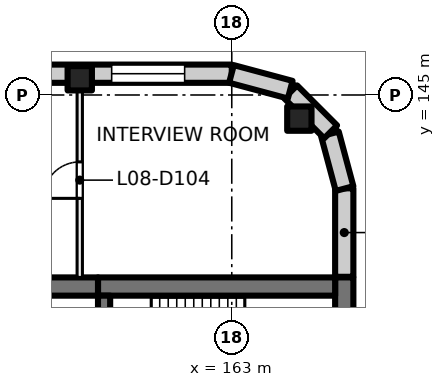
"""IFC4 building model, lengths in metres.
Left out: names, types, materials, properties, quantities, classifications, styles, units other than length and angle.
Written with IfcOpenShell. Run it as: python <this file> out.ifc"""

import sys

from ifc_helpers import new_model, si_unit, direction, frame, frame_2d, origin, origin_2d, place, context, subcontext, project, spatial, rectangle, extrude, element, fill, save


model = new_model("IFC4")
c1 = context("Model", 3, precision=1e-05, world=origin(), true_north=direction((0.0, 1.0)))
c2 = subcontext(c1, "Body", "Model", "MODEL_VIEW")
j1 = project(units=[si_unit("LENGTHUNIT", "METRE"), si_unit("PLANEANGLEUNIT", "RADIAN")], contexts=[c1])
p1 = place(None, origin())
s1 = spatial("IfcSite", under=j1, at=p1, CompositionType="ELEMENT")
p2 = place(p1, origin())
s2 = spatial("IfcBuilding", under=s1, at=p2, CompositionType="ELEMENT")
p3 = place(p2, frame((0.0, 0.0, 39.5)))
s3 = spatial("IfcBuildingStorey", under=s2, at=p3, CompositionType="ELEMENT", Elevation=39.5)
for number, where, z_axis, x_axis in (
    (1, (165.223, 144.223, 0.0), (0.0, 0.0, 1.0), (1.0, 0.0, 0.0)),
    (2, (158.0, 145.55, 0.0), (0.0, 0.0, 1.0), (1.0, 0.0, 0.0)),
):
    element("IfcColumn", number, at=place(p3, frame(where, z_axis=z_axis, x_axis=x_axis)), inside=s3, PredefinedType="COLUMN", context=c2, shape_type="SweptSolid", body=[
        extrude(rectangle(XDim=0.8, YDim=0.8, at=origin_2d()), origin(), (0.0, 0.0, 1.0), 4.0),
    ])
p4 = place(p3, frame((166.7, 139.0, 0.0), z_axis=(0.0, 0.0, 1.0), x_axis=(0.0, -1.0, 0.0)))
e3 = element("IfcWall", 3, at=p4, inside=s3, PredefinedType="SHEAR", context=c2, shape_type="SweptSolid", body=[
    extrude(rectangle(XDim=3.8, YDim=0.6, at=frame_2d((1.9, 0.0))), origin(), (0.0, 0.0, 1.0), 4.0),
])
p5 = place(p3, frame((166.4, 138.7, 0.0), z_axis=(0.0, 0.0, 1.0), x_axis=(-1.0, 0.0, 0.0)))
e4 = element("IfcWall", 4, at=p5, inside=s3, PredefinedType="SHEAR", context=c2, shape_type="SweptSolid", body=[
    extrude(rectangle(XDim=7.8, YDim=0.6, at=frame_2d((3.9, 0.0))), origin(), (0.0, 0.0, 1.0), 4.0),
])
p6 = place(p3, frame((158.6, 138.7, 0.0), z_axis=(0.0, 0.0, 1.0), x_axis=(-1.0, 0.0, 0.0)))
e5 = element("IfcWall", 5, at=p6, inside=s3, PredefinedType="SHEAR", context=c2, shape_type="SweptSolid", body=[
    extrude(rectangle(XDim=4.6, YDim=0.6, at=frame_2d((2.3, 0.0))), origin(), (0.0, 0.0, 1.0), 4.0),
])
p7 = place(p3, frame((158.8, 138.4, 0.0), z_axis=(0.0, 0.0, 1.0), x_axis=(0.0, -1.0, 0.0)))
e6 = element("IfcWall", 6, at=p7, inside=s3, PredefinedType="SHEAR", context=c2, shape_type="SweptSolid", body=[
    extrude(rectangle(XDim=2.8, YDim=0.4, at=frame_2d((1.4, 0.0))), origin(), (0.0, 0.0, 1.0), 4.0),
])
p8 = place(p7, frame((0.9, 0.0, 0.0)))
e7 = element("IfcOpeningElement", 7, at=p8, cuts=e6, PredefinedType="OPENING", context=c2, shape_type="SweptSolid", body=[
    extrude(rectangle(XDim=1.0, YDim=2.1, at=frame_2d((0.5, 1.05))), frame((0.0, 0.21, 0.0), z_axis=(0.0, -1.0, 0.0), x_axis=(1.0, 0.0, 0.0)), (0.0, 0.0, 1.0), 0.42),
])
p9 = place(p3, frame((131.07, 145.7, 0.0), z_axis=(0.0, 0.0, 1.0), x_axis=(1.0, 0.0, 0.0)))
e8 = element("IfcWall", 8, at=p9, inside=s3, PredefinedType="SOLIDWALL", context=c2, shape_type="SweptSolid", body=[
    extrude(rectangle(XDim=31.93, YDim=0.6, at=frame_2d((15.965, 0.0))), origin(), (0.0, 0.0, 1.0), 3.625),
])
p10 = place(p9, frame((0.98, 0.0, 0.9)))
e9 = element("IfcOpeningElement", 9, at=p10, cuts=e8, PredefinedType="OPENING", context=c2, shape_type="SweptSolid", body=[
    extrude(rectangle(XDim=2.4, YDim=2.4, at=frame_2d((1.2, 1.2))), frame((0.0, 0.31, 0.0), z_axis=(0.0, -1.0, 0.0), x_axis=(1.0, 0.0, 0.0)), (0.0, 0.0, 1.0), 0.62),
])
p11 = place(p9, frame((5.48, 0.0, 0.9)))
e10 = element("IfcOpeningElement", 10, at=p11, cuts=e8, PredefinedType="OPENING", context=c2, shape_type="SweptSolid", body=[
    extrude(rectangle(XDim=2.4, YDim=2.4, at=frame_2d((1.2, 1.2))), frame((0.0, 0.31, 0.0), z_axis=(0.0, -1.0, 0.0), x_axis=(1.0, 0.0, 0.0)), (0.0, 0.0, 1.0), 0.62),
])
p12 = place(p9, frame((9.98, 0.0, 0.9)))
e11 = element("IfcOpeningElement", 11, at=p12, cuts=e8, PredefinedType="OPENING", context=c2, shape_type="SweptSolid", body=[
    extrude(rectangle(XDim=2.4, YDim=2.4, at=frame_2d((1.2, 1.2))), frame((0.0, 0.31, 0.0), z_axis=(0.0, -1.0, 0.0), x_axis=(1.0, 0.0, 0.0)), (0.0, 0.0, 1.0), 0.62),
])
p13 = place(p9, frame((14.48, 0.0, 0.9)))
e12 = element("IfcOpeningElement", 12, at=p13, cuts=e8, PredefinedType="OPENING", context=c2, shape_type="SweptSolid", body=[
    extrude(rectangle(XDim=2.4, YDim=2.4, at=frame_2d((1.2, 1.2))), frame((0.0, 0.31, 0.0), z_axis=(0.0, -1.0, 0.0), x_axis=(1.0, 0.0, 0.0)), (0.0, 0.0, 1.0), 0.62),
])
p14 = place(p9, frame((18.98, 0.0, 0.9)))
e13 = element("IfcOpeningElement", 13, at=p14, cuts=e8, PredefinedType="OPENING", context=c2, shape_type="SweptSolid", body=[
    extrude(rectangle(XDim=2.4, YDim=2.4, at=frame_2d((1.2, 1.2))), frame((0.0, 0.31, 0.0), z_axis=(0.0, -1.0, 0.0), x_axis=(1.0, 0.0, 0.0)), (0.0, 0.0, 1.0), 0.62),
])
p15 = place(p9, frame((23.48, 0.0, 0.9)))
e14 = element("IfcOpeningElement", 14, at=p15, cuts=e8, PredefinedType="OPENING", context=c2, shape_type="SweptSolid", body=[
    extrude(rectangle(XDim=2.4, YDim=2.4, at=frame_2d((1.2, 1.2))), frame((0.0, 0.31, 0.0), z_axis=(0.0, -1.0, 0.0), x_axis=(1.0, 0.0, 0.0)), (0.0, 0.0, 1.0), 0.62),
])
p16 = place(p9, frame((27.98, 0.0, 0.9)))
e15 = element("IfcOpeningElement", 15, at=p16, cuts=e8, PredefinedType="OPENING", context=c2, shape_type="SweptSolid", body=[
    extrude(rectangle(XDim=2.4, YDim=2.4, at=frame_2d((1.2, 1.2))), frame((0.0, 0.31, 0.0), z_axis=(0.0, -1.0, 0.0), x_axis=(1.0, 0.0, 0.0)), (0.0, 0.0, 1.0), 0.62),
])
p17 = place(p3, frame((166.7, 141.93, 0.0), z_axis=(0.0, 0.0, 1.0), x_axis=(0.0, -1.0, 0.0)))
e16 = element("IfcWall", 16, at=p17, inside=s3, PredefinedType="SOLIDWALL", context=c2, shape_type="SweptSolid", body=[
    extrude(rectangle(XDim=2.91, YDim=0.6, at=frame_2d((1.455, 0.0))), origin(), (0.0, 0.0, 1.0), 3.625),
])
for number, where, z_axis, x_axis in (
    (17, (166.229, 143.719, 0.0), (0.0, 0.0, 1.0), (0.259, -0.966, 0.0)),
    (18, (164.936, 145.104, 0.0), (0.0, 0.0, 1.0), (0.707, -0.707, 0.0)),
):
    element("IfcWall", number, at=place(p3, frame(where, z_axis=z_axis, x_axis=x_axis)), inside=s3, PredefinedType="SOLIDWALL", context=c2, shape_type="SweptSolid", body=[
        extrude(rectangle(XDim=1.861, YDim=0.6, at=frame_2d((0.93, 0.0))), origin(), (0.0, 0.0, 1.0), 3.625),
    ])
p18 = place(p3, frame((162.99, 145.692, 0.0), z_axis=(0.0, 0.0, 1.0), x_axis=(0.965920269068, -0.258839784042, 0.0)))
e19 = element("IfcWall", 19, at=p18, inside=s3, PredefinedType="SOLIDWALL", context=c2, shape_type="SweptSolid", body=[
    extrude(rectangle(XDim=2.0, YDim=0.6, at=frame_2d((1.0, 0.0))), origin(), (0.0, 0.0, 1.0), 3.625),
])
p19 = place(p3, frame((158.0, 139.0, 0.0), z_axis=(0.0, 0.0, 1.0), x_axis=(0.0, 1.0, 0.0)))
e20 = element("IfcWall", 20, at=p19, inside=s3, PredefinedType="PARTITIONING", context=c2, shape_type="SweptSolid", body=[
    extrude(rectangle(XDim=6.4, YDim=0.175, at=frame_2d((3.2, 0.0))), origin(), (0.0, 0.0, 1.0), 3.625),
])
p20 = place(p19, frame((2.6, 0.0, 0.0)))
e21 = element("IfcOpeningElement", 21, at=p20, cuts=e20, PredefinedType="OPENING", context=c2, shape_type="SweptSolid", body=[
    extrude(rectangle(XDim=1.2, YDim=2.1, at=frame_2d((0.6, 1.05))), frame((0.0, 0.097, 0.0), z_axis=(0.0, -1.0, 0.0), x_axis=(1.0, 0.0, 0.0)), (0.0, 0.0, 1.0), 0.195),
])
p21 = place(p16, origin())
e22 = element("IfcWindow", 22, at=p21, inside=s3, PartitioningType="SINGLE_PANEL", PredefinedType="WINDOW", context=c2, shape_type="SweptSolid", body=[
    extrude(rectangle(XDim=2.4, YDim=2.4, at=frame_2d((1.2, 1.2))), frame((0.0, 0.03, 0.0), z_axis=(0.0, -1.0, 0.0), x_axis=(1.0, 0.0, 0.0)), (0.0, 0.0, 1.0), 0.06),
])
fill(e15, e22)
p22 = place(p20, origin())
e23 = element("IfcDoor", 23, at=p22, inside=s3, OperationType="DOUBLE_DOOR_SINGLE_SWING", PredefinedType="DOOR", context=c2, shape_type="SweptSolid", body=[
    extrude(rectangle(XDim=1.2, YDim=2.1, at=frame_2d((0.6, 1.05))), frame((0.0, 0.025, 0.0), z_axis=(0.0, -1.0, 0.0), x_axis=(1.0, 0.0, 0.0)), (0.0, 0.0, 1.0), 0.05),
])
fill(e21, e23)
save(model, sys.argv[1])
